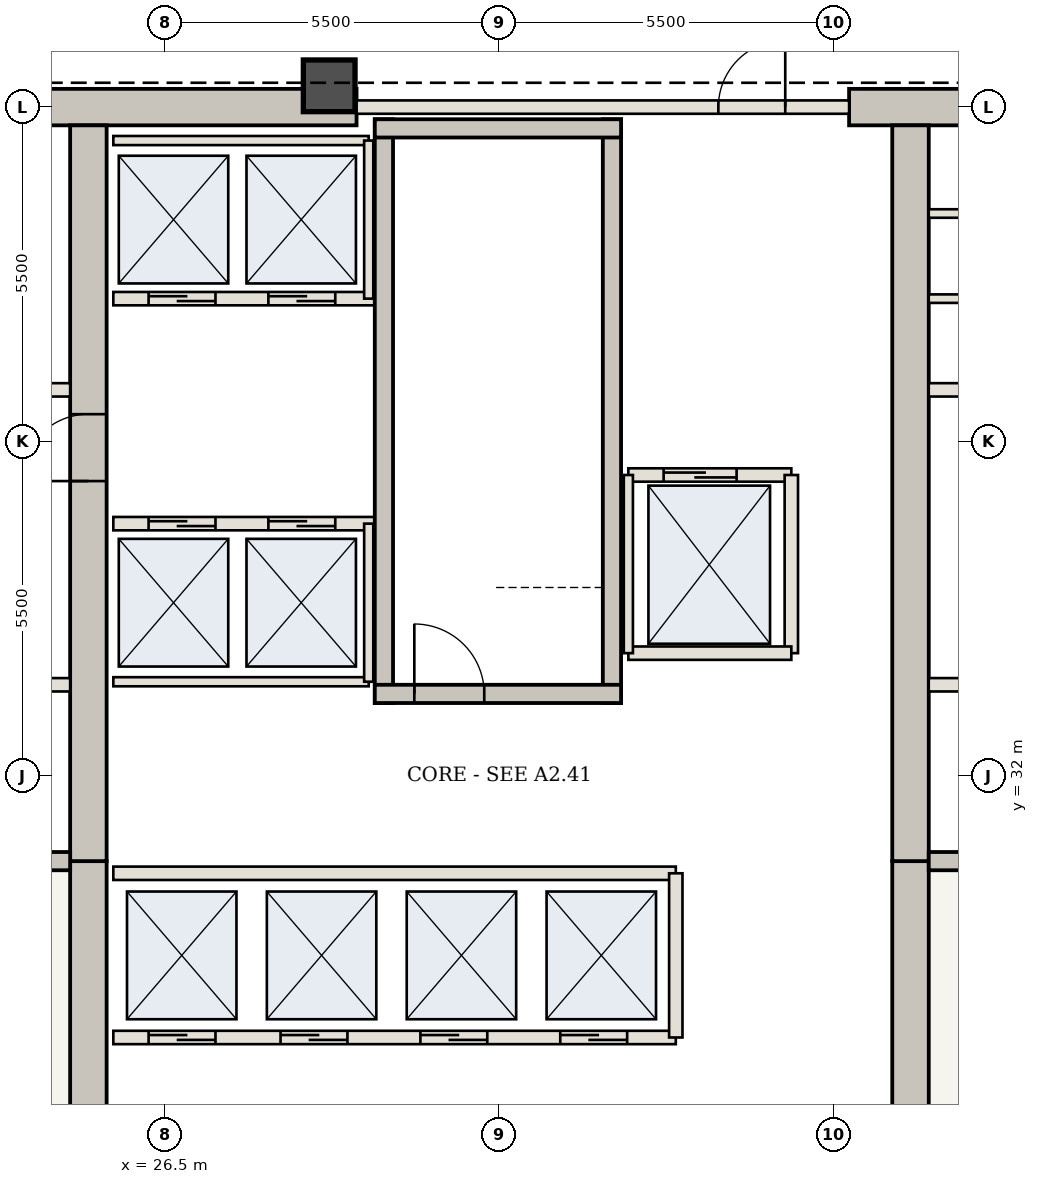
"""IFC4 building model, lengths in metres.
Left out: names, types, materials, properties, quantities, classifications, styles, units other than length and angle.
Written with IfcOpenShell. Run it as: python <this file> out.ifc"""

import sys

from ifc_helpers import new_model, si_unit, direction, frame, frame_2d, origin, origin_2d, place, context, subcontext, project, spatial, rectangle, extrude, element, fill, save


model = new_model("IFC4")
c1 = context("Model", 3, precision=1e-05, world=origin(), true_north=direction((0.0, 1.0)))
c2 = subcontext(c1, "Body", "Model", "MODEL_VIEW")
j1 = project(units=[si_unit("LENGTHUNIT", "METRE"), si_unit("PLANEANGLEUNIT", "RADIAN")], contexts=[c1])
p1 = place(None, origin())
s1 = spatial("IfcSite", under=j1, at=p1, CompositionType="ELEMENT")
p2 = place(p1, origin())
s2 = spatial("IfcBuilding", under=s1, at=p2, CompositionType="ELEMENT")
p3 = place(p2, frame((0.0, 0.0, 182.35)))
s3 = spatial("IfcBuildingStorey", under=s2, at=p3, CompositionType="ELEMENT", Elevation=182.35)
p4 = place(p3, frame((21.41, 43.0, 0.0), z_axis=(0.0, 0.0, 1.0), x_axis=(1.0, 0.0, 0.0)))
e1 = element("IfcWall", 1, at=p4, inside=s3, PredefinedType="SHEAR", context=c2, shape_type="SweptSolid", body=[
    extrude(rectangle(XDim=8.24, YDim=0.6, at=frame_2d((4.12, 0.0))), origin(), (0.0, 0.0, 1.0), 4.55),
])
p5 = place(p3, frame((37.75, 43.0, 0.0), z_axis=(0.0, 0.0, 1.0), x_axis=(1.0, 0.0, 0.0)))
e2 = element("IfcWall", 2, at=p5, inside=s3, PredefinedType="SHEAR", context=c2, shape_type="SweptSolid", body=[
    extrude(rectangle(XDim=4.84, YDim=0.6, at=frame_2d((2.42, 0.0))), origin(), (0.0, 0.0, 1.0), 4.55),
])
p6 = place(p3, frame((25.24, 21.25, 0.0), z_axis=(0.0, 0.0, 1.0), x_axis=(0.0, 1.0, 0.0)))
e3 = element("IfcWall", 3, at=p6, inside=s3, PredefinedType="SHEAR", context=c2, shape_type="SweptSolid", body=[
    extrude(rectangle(XDim=9.35, YDim=0.6, at=frame_2d((4.675, 0.0))), origin(), (0.0, 0.0, 1.0), 4.55),
])
p7 = place(p3, frame((25.24, 30.6, 0.0), z_axis=(0.0, 0.0, 1.0), x_axis=(0.0, 1.0, 0.0)))
e4 = element("IfcWall", 4, at=p7, inside=s3, PredefinedType="SHEAR", context=c2, shape_type="SweptSolid", body=[
    extrude(rectangle(XDim=12.1, YDim=0.6, at=frame_2d((6.05, 0.0))), origin(), (0.0, 0.0, 1.0), 4.55),
])
p8 = place(p7, frame((6.25, 0.0, 0.0)))
e5 = element("IfcOpeningElement", 5, at=p8, cuts=e4, PredefinedType="OPENING", context=c2, shape_type="SweptSolid", body=[
    extrude(rectangle(XDim=1.1, YDim=2.15, at=frame_2d((0.55, 1.075))), frame((0.0, 0.31, 0.0), z_axis=(0.0, -1.0, 0.0), x_axis=(1.0, 0.0, 0.0)), (0.0, 0.0, 1.0), 0.62),
])
p9 = place(p3, frame((38.76, 21.25, 0.0), z_axis=(0.0, 0.0, 1.0), x_axis=(0.0, 1.0, 0.0)))
e6 = element("IfcWall", 6, at=p9, inside=s3, PredefinedType="SHEAR", context=c2, shape_type="SweptSolid", body=[
    extrude(rectangle(XDim=9.35, YDim=0.6, at=frame_2d((4.675, 0.0))), origin(), (0.0, 0.0, 1.0), 4.55),
])
p10 = place(p3, frame((38.76, 30.6, 0.0), z_axis=(0.0, 0.0, 1.0), x_axis=(0.0, 1.0, 0.0)))
e7 = element("IfcWall", 7, at=p10, inside=s3, PredefinedType="SHEAR", context=c2, shape_type="SweptSolid", body=[
    extrude(rectangle(XDim=12.1, YDim=0.6, at=frame_2d((6.05, 0.0))), origin(), (0.0, 0.0, 1.0), 4.55),
])
p11 = place(p3, frame((29.2, 43.35, 0.0), z_axis=(0.0, 0.0, 1.0), x_axis=(1.0, 0.0, 0.0)))
e8 = element("IfcColumn", 8, at=p11, inside=s3, PredefinedType="COLUMN", context=c2, shape_type="SweptSolid", body=[
    extrude(rectangle(XDim=0.85, YDim=0.85, at=origin_2d()), origin(), (0.0, 0.0, 1.0), 4.55),
])
for number, where, z_axis, x_axis in (
    (9, (21.41, 30.6, 0.0), (0.0, 0.0, 1.0), (1.0, 0.0, 0.0)),
    (10, (39.06, 30.6, 0.0), (0.0, 0.0, 1.0), (1.0, 0.0, 0.0)),
):
    element("IfcWall", number, at=place(p3, frame(where, z_axis=z_axis, x_axis=x_axis)), inside=s3, PredefinedType="SHEAR", context=c2, shape_type="SweptSolid", body=[
        extrude(rectangle(XDim=3.53, YDim=0.3, at=frame_2d((1.765, 0.0))), origin(), (0.0, 0.0, 1.0), 4.13),
    ])
p12 = place(p3, frame((21.41, 33.5, 0.0), z_axis=(0.0, 0.0, 1.0), x_axis=(1.0, 0.0, 0.0)))
e11 = element("IfcWall", 11, at=p12, inside=s3, PredefinedType="STANDARD", context=c2, shape_type="SweptSolid", body=[
    extrude(rectangle(XDim=3.53, YDim=0.22, at=frame_2d((1.765, 0.0))), origin(), (0.0, 0.0, 1.0), 4.13),
])
p13 = place(p12, frame((0.75, 0.0, 0.0)))
e12 = element("IfcOpeningElement", 12, at=p13, cuts=e11, PredefinedType="OPENING", context=c2, shape_type="SweptSolid", body=[
    extrude(rectangle(XDim=1.2, YDim=2.2, at=frame_2d((0.6, 1.1))), frame((0.0, 0.12, 0.0), z_axis=(0.0, -1.0, 0.0), x_axis=(1.0, 0.0, 0.0)), (0.0, 0.0, 1.0), 0.24),
])
p14 = place(p3, frame((39.06, 33.5, 0.0), z_axis=(0.0, 0.0, 1.0), x_axis=(1.0, 0.0, 0.0)))
e13 = element("IfcWall", 13, at=p14, inside=s3, PredefinedType="STANDARD", context=c2, shape_type="SweptSolid", body=[
    extrude(rectangle(XDim=3.53, YDim=0.22, at=frame_2d((1.765, 0.0))), origin(), (0.0, 0.0, 1.0), 4.13),
])
p15 = place(p14, frame((1.55, 0.0, 0.0)))
e14 = element("IfcOpeningElement", 14, at=p15, cuts=e13, PredefinedType="OPENING", context=c2, shape_type="SweptSolid", body=[
    extrude(rectangle(XDim=1.2, YDim=2.2, at=frame_2d((0.6, 1.1))), frame((0.0, 0.12, 0.0), z_axis=(0.0, -1.0, 0.0), x_axis=(1.0, 0.0, 0.0)), (0.0, 0.0, 1.0), 0.24),
])
for number, where, z_axis, x_axis in (
    (15, (21.41, 38.35, 0.0), (0.0, 0.0, 1.0), (1.0, 0.0, 0.0)),
    (16, (39.06, 38.35, 0.0), (0.0, 0.0, 1.0), (1.0, 0.0, 0.0)),
):
    element("IfcWall", number, at=place(p3, frame(where, z_axis=z_axis, x_axis=x_axis)), inside=s3, PredefinedType="STANDARD", context=c2, shape_type="SweptSolid", body=[
        extrude(rectangle(XDim=3.53, YDim=0.22, at=frame_2d((1.765, 0.0))), origin(), (0.0, 0.0, 1.0), 4.13),
    ])
for number, where, z_axis, x_axis in (
    (17, (39.06, 39.85, 0.0), (0.0, 0.0, 1.0), (1.0, 0.0, 0.0)),
    (18, (39.06, 41.25, 0.0), (0.0, 0.0, 1.0), (1.0, 0.0, 0.0)),
):
    element("IfcWall", number, at=place(p3, frame(where, z_axis=z_axis, x_axis=x_axis)), inside=s3, PredefinedType="STANDARD", context=c2, shape_type="SweptSolid", body=[
        extrude(rectangle(XDim=3.53, YDim=0.14, at=frame_2d((1.765, 0.0))), origin(), (0.0, 0.0, 1.0), 4.13),
    ])
p16 = place(p3, frame((25.65, 27.7, 0.0), z_axis=(0.0, 0.0, 1.0), x_axis=(1.0, 0.0, 0.0)))
e19 = element("IfcWall", 19, at=p16, inside=s3, PredefinedType="STANDARD", context=c2, shape_type="SweptSolid", body=[
    extrude(rectangle(XDim=9.25, YDim=0.22, at=frame_2d((4.625, 0.0))), origin(), (0.0, 0.0, 1.0), 4.13),
])
p17 = place(p16, frame((0.58, 0.0, 0.0)))
e20 = element("IfcOpeningElement", 20, at=p17, cuts=e19, PredefinedType="OPENING", context=c2, shape_type="SweptSolid", body=[
    extrude(rectangle(XDim=1.1, YDim=2.15, at=frame_2d((0.55, 1.075))), frame((0.0, 0.12, 0.0), z_axis=(0.0, -1.0, 0.0), x_axis=(1.0, 0.0, 0.0)), (0.0, 0.0, 1.0), 0.24),
])
p18 = place(p16, frame((2.75, 0.0, 0.0)))
e21 = element("IfcOpeningElement", 21, at=p18, cuts=e19, PredefinedType="OPENING", context=c2, shape_type="SweptSolid", body=[
    extrude(rectangle(XDim=1.1, YDim=2.15, at=frame_2d((0.55, 1.075))), frame((0.0, 0.12, 0.0), z_axis=(0.0, -1.0, 0.0), x_axis=(1.0, 0.0, 0.0)), (0.0, 0.0, 1.0), 0.24),
])
p19 = place(p16, frame((5.05, 0.0, 0.0)))
e22 = element("IfcOpeningElement", 22, at=p19, cuts=e19, PredefinedType="OPENING", context=c2, shape_type="SweptSolid", body=[
    extrude(rectangle(XDim=1.1, YDim=2.15, at=frame_2d((0.55, 1.075))), frame((0.0, 0.12, 0.0), z_axis=(0.0, -1.0, 0.0), x_axis=(1.0, 0.0, 0.0)), (0.0, 0.0, 1.0), 0.24),
])
p20 = place(p16, frame((7.35, 0.0, 0.0)))
e23 = element("IfcOpeningElement", 23, at=p20, cuts=e19, PredefinedType="OPENING", context=c2, shape_type="SweptSolid", body=[
    extrude(rectangle(XDim=1.1, YDim=2.15, at=frame_2d((0.55, 1.075))), frame((0.0, 0.12, 0.0), z_axis=(0.0, -1.0, 0.0), x_axis=(1.0, 0.0, 0.0)), (0.0, 0.0, 1.0), 0.24),
])
p21 = place(p3, frame((25.65, 30.4, 0.0), z_axis=(0.0, 0.0, 1.0), x_axis=(1.0, 0.0, 0.0)))
e24 = element("IfcWall", 24, at=p21, inside=s3, PredefinedType="STANDARD", context=c2, shape_type="SweptSolid", body=[
    extrude(rectangle(XDim=9.25, YDim=0.22, at=frame_2d((4.625, 0.0))), origin(), (0.0, 0.0, 1.0), 4.13),
])
p22 = place(p3, frame((34.9, 27.7, 0.0), z_axis=(0.0, 0.0, 1.0), x_axis=(0.0, 1.0, 0.0)))
e25 = element("IfcWall", 25, at=p22, inside=s3, PredefinedType="STANDARD", context=c2, shape_type="SweptSolid", body=[
    extrude(rectangle(XDim=2.7, YDim=0.22, at=frame_2d((1.35, 0.0))), origin(), (0.0, 0.0, 1.0), 4.13),
])
p23 = place(p3, frame((25.65, 36.15, 0.0), z_axis=(0.0, 0.0, 1.0), x_axis=(1.0, 0.0, 0.0)))
e26 = element("IfcWall", 26, at=p23, inside=s3, PredefinedType="STANDARD", context=c2, shape_type="SweptSolid", body=[
    extrude(rectangle(XDim=4.3, YDim=0.22, at=frame_2d((2.15, 0.0))), origin(), (0.0, 0.0, 1.0), 4.13),
])
p24 = place(p23, frame((0.58, 0.0, 0.0)))
e27 = element("IfcOpeningElement", 27, at=p24, cuts=e26, PredefinedType="OPENING", context=c2, shape_type="SweptSolid", body=[
    extrude(rectangle(XDim=1.1, YDim=2.15, at=frame_2d((0.55, 1.075))), frame((0.0, 0.12, 0.0), z_axis=(0.0, -1.0, 0.0), x_axis=(1.0, 0.0, 0.0)), (0.0, 0.0, 1.0), 0.24),
])
p25 = place(p23, frame((2.55, 0.0, 0.0)))
e28 = element("IfcOpeningElement", 28, at=p25, cuts=e26, PredefinedType="OPENING", context=c2, shape_type="SweptSolid", body=[
    extrude(rectangle(XDim=1.1, YDim=2.15, at=frame_2d((0.55, 1.075))), frame((0.0, 0.12, 0.0), z_axis=(0.0, -1.0, 0.0), x_axis=(1.0, 0.0, 0.0)), (0.0, 0.0, 1.0), 0.24),
])
p26 = place(p3, frame((25.65, 33.55, 0.0), z_axis=(0.0, 0.0, 1.0), x_axis=(1.0, 0.0, 0.0)))
e29 = element("IfcWall", 29, at=p26, inside=s3, PredefinedType="STANDARD", context=c2, shape_type="SweptSolid", body=[
    extrude(rectangle(XDim=4.2, YDim=0.15, at=frame_2d((2.1, 0.0))), origin(), (0.0, 0.0, 1.0), 4.13),
])
p27 = place(p3, frame((29.85, 33.55, 0.0), z_axis=(0.0, 0.0, 1.0), x_axis=(0.0, 1.0, 0.0)))
e30 = element("IfcWall", 30, at=p27, inside=s3, PredefinedType="STANDARD", context=c2, shape_type="SweptSolid", body=[
    extrude(rectangle(XDim=2.6, YDim=0.15, at=frame_2d((1.3, 0.0))), origin(), (0.0, 0.0, 1.0), 4.13),
])
p28 = place(p3, frame((25.65, 39.85, 0.0), z_axis=(0.0, 0.0, 1.0), x_axis=(1.0, 0.0, 0.0)))
e31 = element("IfcWall", 31, at=p28, inside=s3, PredefinedType="STANDARD", context=c2, shape_type="SweptSolid", body=[
    extrude(rectangle(XDim=4.3, YDim=0.22, at=frame_2d((2.15, 0.0))), origin(), (0.0, 0.0, 1.0), 4.13),
])
p29 = place(p28, frame((0.58, 0.0, 0.0)))
e32 = element("IfcOpeningElement", 32, at=p29, cuts=e31, PredefinedType="OPENING", context=c2, shape_type="SweptSolid", body=[
    extrude(rectangle(XDim=1.1, YDim=2.15, at=frame_2d((0.55, 1.075))), frame((0.0, 0.12, 0.0), z_axis=(0.0, -1.0, 0.0), x_axis=(1.0, 0.0, 0.0)), (0.0, 0.0, 1.0), 0.24),
])
p30 = place(p28, frame((2.55, 0.0, 0.0)))
e33 = element("IfcOpeningElement", 33, at=p30, cuts=e31, PredefinedType="OPENING", context=c2, shape_type="SweptSolid", body=[
    extrude(rectangle(XDim=1.1, YDim=2.15, at=frame_2d((0.55, 1.075))), frame((0.0, 0.12, 0.0), z_axis=(0.0, -1.0, 0.0), x_axis=(1.0, 0.0, 0.0)), (0.0, 0.0, 1.0), 0.24),
])
p31 = place(p3, frame((25.65, 42.45, 0.0), z_axis=(0.0, 0.0, 1.0), x_axis=(1.0, 0.0, 0.0)))
e34 = element("IfcWall", 34, at=p31, inside=s3, PredefinedType="STANDARD", context=c2, shape_type="SweptSolid", body=[
    extrude(rectangle(XDim=4.2, YDim=0.15, at=frame_2d((2.1, 0.0))), origin(), (0.0, 0.0, 1.0), 4.13),
])
p32 = place(p3, frame((29.85, 39.85, 0.0), z_axis=(0.0, 0.0, 1.0), x_axis=(0.0, 1.0, 0.0)))
e35 = element("IfcWall", 35, at=p32, inside=s3, PredefinedType="STANDARD", context=c2, shape_type="SweptSolid", body=[
    extrude(rectangle(XDim=2.6, YDim=0.15, at=frame_2d((1.3, 0.0))), origin(), (0.0, 0.0, 1.0), 4.13),
])
for number, where, z_axis, x_axis in (
    (36, (30.1, 33.2, 0.0), (0.0, 0.0, 1.0), (0.0, 1.0, 0.0)),
    (37, (33.85, 33.2, 0.0), (0.0, 0.0, 1.0), (0.0, 1.0, 0.0)),
):
    element("IfcWall", number, at=place(p3, frame(where, z_axis=z_axis, x_axis=x_axis)), inside=s3, PredefinedType="SHEAR", context=c2, shape_type="SweptSolid", body=[
        extrude(rectangle(XDim=9.6, YDim=0.3, at=frame_2d((4.8, 0.0))), origin(), (0.0, 0.0, 1.0), 4.13),
    ])
p33 = place(p3, frame((29.95, 33.35, 0.0), z_axis=(0.0, 0.0, 1.0), x_axis=(1.0, 0.0, 0.0)))
e38 = element("IfcWall", 38, at=p33, inside=s3, PredefinedType="SHEAR", context=c2, shape_type="SweptSolid", body=[
    extrude(rectangle(XDim=4.05, YDim=0.3, at=frame_2d((2.025, 0.0))), origin(), (0.0, 0.0, 1.0), 4.13),
])
p34 = place(p33, frame((0.65, 0.0, 0.0)))
e39 = element("IfcOpeningElement", 39, at=p34, cuts=e38, PredefinedType="OPENING", context=c2, shape_type="SweptSolid", body=[
    extrude(rectangle(XDim=1.15, YDim=2.15, at=frame_2d((0.575, 1.075))), frame((0.0, 0.16, 0.0), z_axis=(0.0, -1.0, 0.0), x_axis=(1.0, 0.0, 0.0)), (0.0, 0.0, 1.0), 0.32),
])
p35 = place(p3, frame((29.95, 42.65, 0.0), z_axis=(0.0, 0.0, 1.0), x_axis=(1.0, 0.0, 0.0)))
e40 = element("IfcWall", 40, at=p35, inside=s3, PredefinedType="SHEAR", context=c2, shape_type="SweptSolid", body=[
    extrude(rectangle(XDim=4.05, YDim=0.3, at=frame_2d((2.025, 0.0))), origin(), (0.0, 0.0, 1.0), 4.13),
])
p36 = place(p3, frame((29.65, 43.0, 0.0), z_axis=(0.0, 0.0, 1.0), x_axis=(1.0, 0.0, 0.0)))
e41 = element("IfcWall", 41, at=p36, inside=s3, PredefinedType="STANDARD", context=c2, shape_type="SweptSolid", body=[
    extrude(rectangle(XDim=8.1, YDim=0.22, at=frame_2d((4.05, 0.0))), origin(), (0.0, 0.0, 1.0), 4.13),
])
p37 = place(p36, frame((5.95, 0.0, 0.0)))
e42 = element("IfcOpeningElement", 42, at=p37, cuts=e41, PredefinedType="OPENING", context=c2, shape_type="SweptSolid", body=[
    extrude(rectangle(XDim=1.1, YDim=2.15, at=frame_2d((0.55, 1.075))), frame((0.0, 0.12, 0.0), z_axis=(0.0, -1.0, 0.0), x_axis=(1.0, 0.0, 0.0)), (0.0, 0.0, 1.0), 0.24),
])
p38 = place(p3, frame((34.12, 36.95, 0.0), z_axis=(0.0, 0.0, 1.0), x_axis=(1.0, 0.0, 0.0)))
e43 = element("IfcWall", 43, at=p38, inside=s3, PredefinedType="STANDARD", context=c2, shape_type="SweptSolid", body=[
    extrude(rectangle(XDim=2.68, YDim=0.22, at=frame_2d((1.34, 0.0))), origin(), (0.0, 0.0, 1.0), 4.13),
])
p39 = place(p38, frame((0.58, 0.0, 0.0)))
e44 = element("IfcOpeningElement", 44, at=p39, cuts=e43, PredefinedType="OPENING", context=c2, shape_type="SweptSolid", body=[
    extrude(rectangle(XDim=1.2, YDim=2.2, at=frame_2d((0.6, 1.1))), frame((0.0, 0.12, 0.0), z_axis=(0.0, -1.0, 0.0), x_axis=(1.0, 0.0, 0.0)), (0.0, 0.0, 1.0), 0.24),
])
p40 = place(p3, frame((36.8, 34.02, 0.0), z_axis=(0.0, 0.0, 1.0), x_axis=(0.0, 1.0, 0.0)))
e45 = element("IfcWall", 45, at=p40, inside=s3, PredefinedType="STANDARD", context=c2, shape_type="SweptSolid", body=[
    extrude(rectangle(XDim=2.93, YDim=0.22, at=frame_2d((1.465, 0.0))), origin(), (0.0, 0.0, 1.0), 4.13),
])
p41 = place(p3, frame((34.12, 34.02, 0.0), z_axis=(0.0, 0.0, 1.0), x_axis=(1.0, 0.0, 0.0)))
e46 = element("IfcWall", 46, at=p41, inside=s3, PredefinedType="STANDARD", context=c2, shape_type="SweptSolid", body=[
    extrude(rectangle(XDim=2.68, YDim=0.22, at=frame_2d((1.34, 0.0))), origin(), (0.0, 0.0, 1.0), 4.13),
])
p42 = place(p3, frame((34.12, 34.02, 0.0), z_axis=(0.0, 0.0, 1.0), x_axis=(0.0, 1.0, 0.0)))
e47 = element("IfcWall", 47, at=p42, inside=s3, PredefinedType="STANDARD", context=c2, shape_type="SweptSolid", body=[
    extrude(rectangle(XDim=2.93, YDim=0.15, at=frame_2d((1.465, 0.0))), origin(), (0.0, 0.0, 1.0), 4.13),
])
p43 = place(p8, origin())
e48 = element("IfcDoor", 48, at=p43, inside=s3, OperationType="SINGLE_SWING_LEFT", PredefinedType="DOOR", context=c2, shape_type="SweptSolid", body=[
    extrude(rectangle(XDim=1.1, YDim=2.15, at=frame_2d((0.55, 1.075))), frame((0.0, 0.025, 0.0), z_axis=(0.0, -1.0, 0.0), x_axis=(1.0, 0.0, 0.0)), (0.0, 0.0, 1.0), 0.05),
])
fill(e5, e48)
p44 = place(p17, origin())
e49 = element("IfcDoor", 49, at=p44, inside=s3, OperationType="DOUBLE_DOOR_SLIDING", PredefinedType="DOOR", context=c2, shape_type="SweptSolid", body=[
    extrude(rectangle(XDim=1.1, YDim=2.15, at=frame_2d((0.55, 1.075))), frame((0.0, 0.025, 0.0), z_axis=(0.0, -1.0, 0.0), x_axis=(1.0, 0.0, 0.0)), (0.0, 0.0, 1.0), 0.05),
])
fill(e20, e49)
p45 = place(p18, origin())
e50 = element("IfcDoor", 50, at=p45, inside=s3, OperationType="DOUBLE_DOOR_SLIDING", PredefinedType="DOOR", context=c2, shape_type="SweptSolid", body=[
    extrude(rectangle(XDim=1.1, YDim=2.15, at=frame_2d((0.55, 1.075))), frame((0.0, 0.025, 0.0), z_axis=(0.0, -1.0, 0.0), x_axis=(1.0, 0.0, 0.0)), (0.0, 0.0, 1.0), 0.05),
])
fill(e21, e50)
p46 = place(p19, origin())
e51 = element("IfcDoor", 51, at=p46, inside=s3, OperationType="DOUBLE_DOOR_SLIDING", PredefinedType="DOOR", context=c2, shape_type="SweptSolid", body=[
    extrude(rectangle(XDim=1.1, YDim=2.15, at=frame_2d((0.55, 1.075))), frame((0.0, 0.025, 0.0), z_axis=(0.0, -1.0, 0.0), x_axis=(1.0, 0.0, 0.0)), (0.0, 0.0, 1.0), 0.05),
])
fill(e22, e51)
p47 = place(p20, origin())
e52 = element("IfcDoor", 52, at=p47, inside=s3, OperationType="DOUBLE_DOOR_SLIDING", PredefinedType="DOOR", context=c2, shape_type="SweptSolid", body=[
    extrude(rectangle(XDim=1.1, YDim=2.15, at=frame_2d((0.55, 1.075))), frame((0.0, 0.025, 0.0), z_axis=(0.0, -1.0, 0.0), x_axis=(1.0, 0.0, 0.0)), (0.0, 0.0, 1.0), 0.05),
])
fill(e23, e52)
p48 = place(p24, origin())
e53 = element("IfcDoor", 53, at=p48, inside=s3, OperationType="DOUBLE_DOOR_SLIDING", PredefinedType="DOOR", context=c2, shape_type="SweptSolid", body=[
    extrude(rectangle(XDim=1.1, YDim=2.15, at=frame_2d((0.55, 1.075))), frame((0.0, 0.025, 0.0), z_axis=(0.0, -1.0, 0.0), x_axis=(1.0, 0.0, 0.0)), (0.0, 0.0, 1.0), 0.05),
])
fill(e27, e53)
p49 = place(p25, origin())
e54 = element("IfcDoor", 54, at=p49, inside=s3, OperationType="DOUBLE_DOOR_SLIDING", PredefinedType="DOOR", context=c2, shape_type="SweptSolid", body=[
    extrude(rectangle(XDim=1.1, YDim=2.15, at=frame_2d((0.55, 1.075))), frame((0.0, 0.025, 0.0), z_axis=(0.0, -1.0, 0.0), x_axis=(1.0, 0.0, 0.0)), (0.0, 0.0, 1.0), 0.05),
])
fill(e28, e54)
p50 = place(p29, origin())
e55 = element("IfcDoor", 55, at=p50, inside=s3, OperationType="DOUBLE_DOOR_SLIDING", PredefinedType="DOOR", context=c2, shape_type="SweptSolid", body=[
    extrude(rectangle(XDim=1.1, YDim=2.15, at=frame_2d((0.55, 1.075))), frame((0.0, 0.025, 0.0), z_axis=(0.0, -1.0, 0.0), x_axis=(1.0, 0.0, 0.0)), (0.0, 0.0, 1.0), 0.05),
])
fill(e32, e55)
p51 = place(p30, origin())
e56 = element("IfcDoor", 56, at=p51, inside=s3, OperationType="DOUBLE_DOOR_SLIDING", PredefinedType="DOOR", context=c2, shape_type="SweptSolid", body=[
    extrude(rectangle(XDim=1.1, YDim=2.15, at=frame_2d((0.55, 1.075))), frame((0.0, 0.025, 0.0), z_axis=(0.0, -1.0, 0.0), x_axis=(1.0, 0.0, 0.0)), (0.0, 0.0, 1.0), 0.05),
])
fill(e33, e56)
p52 = place(p34, origin())
e57 = element("IfcDoor", 57, at=p52, inside=s3, OperationType="SINGLE_SWING_LEFT", PredefinedType="DOOR", context=c2, shape_type="SweptSolid", body=[
    extrude(rectangle(XDim=1.15, YDim=2.15, at=frame_2d((0.575, 1.075))), frame((0.0, 0.025, 0.0), z_axis=(0.0, -1.0, 0.0), x_axis=(1.0, 0.0, 0.0)), (0.0, 0.0, 1.0), 0.05),
])
fill(e39, e57)
p53 = place(p37, origin())
e58 = element("IfcDoor", 58, at=p53, inside=s3, OperationType="SINGLE_SWING_RIGHT", PredefinedType="DOOR", context=c2, shape_type="SweptSolid", body=[
    extrude(rectangle(XDim=1.1, YDim=2.15, at=frame_2d((0.55, 1.075))), frame((0.0, 0.025, 0.0), z_axis=(0.0, -1.0, 0.0), x_axis=(1.0, 0.0, 0.0)), (0.0, 0.0, 1.0), 0.05),
])
fill(e42, e58)
p54 = place(p39, origin())
e59 = element("IfcDoor", 59, at=p54, inside=s3, OperationType="DOUBLE_DOOR_SLIDING", PredefinedType="DOOR", context=c2, shape_type="SweptSolid", body=[
    extrude(rectangle(XDim=1.2, YDim=2.2, at=frame_2d((0.6, 1.1))), frame((0.0, 0.025, 0.0), z_axis=(0.0, -1.0, 0.0), x_axis=(1.0, 0.0, 0.0)), (0.0, 0.0, 1.0), 0.05),
])
fill(e44, e59)
save(model, sys.argv[1])
